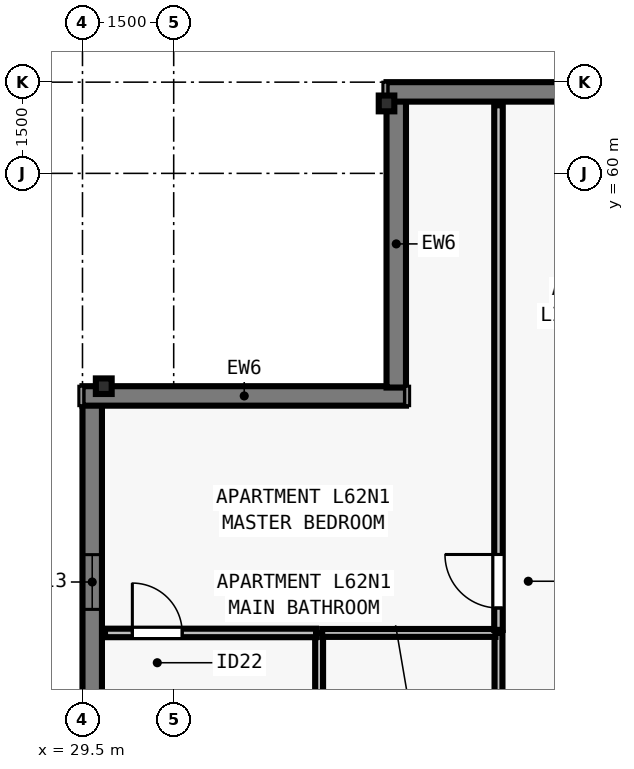
"""IFC4 building model, lengths in metres.
Left out: names, types, materials, properties, quantities, classifications, styles, units other than length and angle.
Written with IfcOpenShell. Run it as: python <this file> out.ifc"""

import sys

from ifc_helpers import new_model, si_unit, direction, frame, frame_2d, origin, origin_2d, place, context, subcontext, project, spatial, rectangle, i_section, extrude, element, fill, save


model = new_model("IFC4")
c1 = context("Model", 3, precision=1e-05, world=origin(), true_north=direction((0.0, 1.0)))
c2 = subcontext(c1, "Body", "Model", "MODEL_VIEW")
j1 = project(units=[si_unit("LENGTHUNIT", "METRE"), si_unit("PLANEANGLEUNIT", "RADIAN")], contexts=[c1])
p1 = place(None, origin())
s1 = spatial("IfcSite", under=j1, at=p1, CompositionType="ELEMENT")
p2 = place(p1, origin())
s2 = spatial("IfcBuilding", under=s1, at=p2, CompositionType="ELEMENT")
p3 = place(p2, frame((0.0, 0.0, 227.0)))
s3 = spatial("IfcBuildingStorey", under=s2, at=p3, CompositionType="ELEMENT", Elevation=227.0)
for number, where, z_axis, x_axis in (
    (1, (34.5, 61.15, 0.0), (0.0, 0.0, 1.0), (1.0, 0.0, 0.0)),
    (2, (29.85, 56.5, 0.0), (0.0, 0.0, 1.0), (0.0, 1.0, 0.0)),
):
    element("IfcColumn", number, at=place(p3, frame(where, z_axis=z_axis, x_axis=x_axis)), inside=s3, PredefinedType="COLUMN", context=c2, shape_type="SweptSolid", body=[
        extrude(i_section(OverallWidth=0.256, OverallDepth=0.26, WebThickness=0.01, FlangeThickness=0.017, FilletRadius=0.013, at=origin_2d()), origin(), (0.0, 0.0, 1.0), 3.5),
    ])
p4 = place(p3, frame((29.66, 49.8, 0.0), z_axis=(0.0, 0.0, 1.0), x_axis=(0.0, 1.0, 0.0)))
e3 = element("IfcWall", 3, at=p4, inside=s3, PredefinedType="SOLIDWALL", context=c2, shape_type="SweptSolid", body=[
    extrude(rectangle(XDim=6.402, YDim=0.32, at=frame_2d((3.201, 0.0))), origin(), (0.0, 0.0, 1.0), 3.29),
])
p5 = place(p4, frame((3.03, 0.0, 0.8)))
e4 = element("IfcOpeningElement", 4, at=p5, cuts=e3, PredefinedType="OPENING", context=c2, shape_type="SweptSolid", body=[
    extrude(rectangle(XDim=0.9, YDim=1.678, at=frame_2d((0.45, 0.839))), frame((0.0, 0.17, 0.0), z_axis=(0.0, -1.0, 0.0), x_axis=(1.0, 0.0, 0.0)), (0.0, 0.0, 1.0), 0.34),
])
p6 = place(p3, frame((29.5, 56.34, 0.0), z_axis=(0.0, 0.0, 1.0), x_axis=(1.0, 0.0, 0.0)))
e5 = element("IfcWall", 5, at=p6, inside=s3, PredefinedType="SOLIDWALL", context=c2, shape_type="SweptSolid", body=[
    extrude(rectangle(XDim=5.32, YDim=0.32, at=frame_2d((2.66, 0.0))), origin(), (0.0, 0.0, 1.0), 3.29),
])
p7 = place(p3, frame((34.66, 56.478, 0.0), z_axis=(0.0, 0.0, 1.0), x_axis=(0.0, 1.0, 0.0)))
e6 = element("IfcWall", 6, at=p7, inside=s3, PredefinedType="SOLIDWALL", context=c2, shape_type="SweptSolid", body=[
    extrude(rectangle(XDim=4.724, YDim=0.32, at=frame_2d((2.362, 0.0))), origin(), (0.0, 0.0, 1.0), 3.29),
])
p8 = place(p3, frame((34.5, 61.34, 0.0), z_axis=(0.0, 0.0, 1.0), x_axis=(1.0, 0.0, 0.0)))
e7 = element("IfcWall", 7, at=p8, inside=s3, PredefinedType="SOLIDWALL", context=c2, shape_type="SweptSolid", body=[
    extrude(rectangle(XDim=34.702, YDim=0.32, at=frame_2d((17.351, 0.0))), origin(), (0.0, 0.0, 1.0), 3.29),
])
p9 = place(p8, frame((4.312, 0.0, 0.8)))
e8 = element("IfcOpeningElement", 8, at=p9, cuts=e7, PredefinedType="OPENING", context=c2, shape_type="SweptSolid", body=[
    extrude(rectangle(XDim=1.55, YDim=1.678, at=frame_2d((0.775, 0.839))), frame((0.0, 0.17, 0.0), z_axis=(0.0, -1.0, 0.0), x_axis=(1.0, 0.0, 0.0)), (0.0, 0.0, 1.0), 0.34),
])
p10 = place(p8, frame((7.988, 0.0, 0.8)))
e9 = element("IfcOpeningElement", 9, at=p10, cuts=e7, PredefinedType="OPENING", context=c2, shape_type="SweptSolid", body=[
    extrude(rectangle(XDim=1.85, YDim=1.678, at=frame_2d((0.925, 0.839))), frame((0.0, 0.17, 0.0), z_axis=(0.0, -1.0, 0.0), x_axis=(1.0, 0.0, 0.0)), (0.0, 0.0, 1.0), 0.34),
])
p11 = place(p8, frame((15.188, 0.0, 0.8)))
e10 = element("IfcOpeningElement", 10, at=p11, cuts=e7, PredefinedType="OPENING", context=c2, shape_type="SweptSolid", body=[
    extrude(rectangle(XDim=1.85, YDim=1.678, at=frame_2d((0.925, 0.839))), frame((0.0, 0.17, 0.0), z_axis=(0.0, -1.0, 0.0), x_axis=(1.0, 0.0, 0.0)), (0.0, 0.0, 1.0), 0.34),
])
p12 = place(p8, frame((18.264, 0.0, 0.8)))
e11 = element("IfcOpeningElement", 11, at=p12, cuts=e7, PredefinedType="OPENING", context=c2, shape_type="SweptSolid", body=[
    extrude(rectangle(XDim=1.55, YDim=1.678, at=frame_2d((0.775, 0.839))), frame((0.0, 0.17, 0.0), z_axis=(0.0, -1.0, 0.0), x_axis=(1.0, 0.0, 0.0)), (0.0, 0.0, 1.0), 0.34),
])
p13 = place(p8, frame((25.014, 0.0, 0.8)))
e12 = element("IfcOpeningElement", 12, at=p13, cuts=e7, PredefinedType="OPENING", context=c2, shape_type="SweptSolid", body=[
    extrude(rectangle(XDim=1.55, YDim=1.678, at=frame_2d((0.775, 0.839))), frame((0.0, 0.17, 0.0), z_axis=(0.0, -1.0, 0.0), x_axis=(1.0, 0.0, 0.0)), (0.0, 0.0, 1.0), 0.34),
])
p14 = place(p8, frame((10.95, 0.0, 0.8)))
e13 = element("IfcOpeningElement", 13, at=p14, cuts=e7, PredefinedType="OPENING", context=c2, shape_type="SweptSolid", body=[
    extrude(rectangle(XDim=0.9, YDim=1.678, at=frame_2d((0.45, 0.839))), frame((0.0, 0.17, 0.0), z_axis=(0.0, -1.0, 0.0), x_axis=(1.0, 0.0, 0.0)), (0.0, 0.0, 1.0), 0.34),
])
p15 = place(p8, frame((22.87, 0.0, 0.8)))
e14 = element("IfcOpeningElement", 14, at=p15, cuts=e7, PredefinedType="OPENING", context=c2, shape_type="SweptSolid", body=[
    extrude(rectangle(XDim=0.9, YDim=1.678, at=frame_2d((0.45, 0.839))), frame((0.0, 0.17, 0.0), z_axis=(0.0, -1.0, 0.0), x_axis=(1.0, 0.0, 0.0)), (0.0, 0.0, 1.0), 0.34),
])
p16 = place(p3, frame((33.391, 49.692, 0.0), z_axis=(0.0, 0.0, 1.0), x_axis=(0.0, 1.0, 0.0)))
e15 = element("IfcWall", 15, at=p16, inside=s3, PredefinedType="PLUMBINGWALL", context=c2, shape_type="SweptSolid", body=[
    extrude(rectangle(XDim=2.75, YDim=0.13, at=frame_2d((1.375, 0.0))), origin(), (0.0, 0.0, 1.0), 3.29),
])
p17 = place(p3, frame((36.341, 49.692, 0.0), z_axis=(0.0, 0.0, 1.0), x_axis=(0.0, 1.0, 0.0)))
e16 = element("IfcWall", 16, at=p17, inside=s3, PredefinedType="PLUMBINGWALL", context=c2, shape_type="SweptSolid", body=[
    extrude(rectangle(XDim=2.75, YDim=0.13, at=frame_2d((1.375, 0.0))), origin(), (0.0, 0.0, 1.0), 3.29),
])
p18 = place(p17, frame((0.55, 0.0, 0.0)))
e17 = element("IfcOpeningElement", 17, at=p18, cuts=e16, PredefinedType="OPENING", context=c2, shape_type="SweptSolid", body=[
    extrude(rectangle(XDim=0.85, YDim=2.08, at=frame_2d((0.425, 1.04))), frame((0.0, 0.075, 0.0), z_axis=(0.0, -1.0, 0.0), x_axis=(1.0, 0.0, 0.0)), (0.0, 0.0, 1.0), 0.15),
])
p19 = place(p3, frame((33.441, 52.442, 0.0), z_axis=(0.0, 0.0, 1.0), x_axis=(1.0, 0.0, 0.0)))
e18 = element("IfcWall", 18, at=p19, inside=s3, PredefinedType="PLUMBINGWALL", context=c2, shape_type="SweptSolid", body=[
    extrude(rectangle(XDim=2.85, YDim=0.13, at=frame_2d((1.425, 0.0))), origin(), (0.0, 0.0, 1.0), 2.958),
])
p20 = place(p3, frame((36.341, 52.492, 0.0), z_axis=(0.0, 0.0, 1.0), x_axis=(0.0, 1.0, 0.0)))
e19 = element("IfcWall", 19, at=p20, inside=s3, PredefinedType="PARTITIONING", context=c2, shape_type="SweptSolid", body=[
    extrude(rectangle(XDim=8.628, YDim=0.14, at=frame_2d((4.314, 0.0))), origin(), (0.0, 0.0, 1.0), 2.573),
])
p21 = place(p20, frame((0.36, 0.0, 0.0)))
e20 = element("IfcOpeningElement", 20, at=p21, cuts=e19, PredefinedType="OPENING", context=c2, shape_type="SweptSolid", body=[
    extrude(rectangle(XDim=0.88, YDim=2.1, at=frame_2d((0.44, 1.05))), frame((0.0, 0.08, 0.0), z_axis=(0.0, -1.0, 0.0), x_axis=(1.0, 0.0, 0.0)), (0.0, 0.0, 1.0), 0.16),
])
p22 = place(p3, frame((29.87, 52.442, 0.0), z_axis=(0.0, 0.0, 1.0), x_axis=(1.0, 0.0, 0.0)))
e21 = element("IfcWall", 21, at=p22, inside=s3, PredefinedType="PARTITIONING", context=c2, shape_type="SweptSolid", body=[
    extrude(rectangle(XDim=3.471, YDim=0.14, at=frame_2d((1.736, 0.0))), origin(), (0.0, 0.0, 1.0), 3.29),
])
p23 = place(p22, frame((0.45, 0.0, 0.0)))
e22 = element("IfcOpeningElement", 22, at=p23, cuts=e21, PredefinedType="OPENING", context=c2, shape_type="SweptSolid", body=[
    extrude(rectangle(XDim=0.82, YDim=2.1, at=frame_2d((0.41, 1.05))), frame((0.0, 0.08, 0.0), z_axis=(0.0, -1.0, 0.0), x_axis=(1.0, 0.0, 0.0)), (0.0, 0.0, 1.0), 0.16),
])
p24 = place(p5, origin())
e23 = element("IfcWindow", 23, at=p24, inside=s3, PartitioningType="SINGLE_PANEL", PredefinedType="WINDOW", context=c2, shape_type="SweptSolid", body=[
    extrude(rectangle(XDim=0.9, YDim=1.678, at=frame_2d((0.45, 0.839))), frame((0.0, -0.04, 0.0), z_axis=(0.0, -1.0, 0.0), x_axis=(1.0, 0.0, 0.0)), (0.0, 0.0, 1.0), 0.06),
])
fill(e4, e23)
p25 = place(p23, origin())
e24 = element("IfcDoor", 24, at=p25, inside=s3, OperationType="SINGLE_SWING_LEFT", PredefinedType="DOOR", context=c2, shape_type="SweptSolid", body=[
    extrude(rectangle(XDim=0.82, YDim=2.1, at=frame_2d((0.41, 1.05))), frame((0.0, 0.025, 0.0), z_axis=(0.0, -1.0, 0.0), x_axis=(1.0, 0.0, 0.0)), (0.0, 0.0, 1.0), 0.05),
])
fill(e22, e24)
p26 = place(p21, origin())
e25 = element("IfcDoor", 25, at=p26, inside=s3, OperationType="SINGLE_SWING_RIGHT", PredefinedType="DOOR", context=c2, shape_type="SweptSolid", body=[
    extrude(rectangle(XDim=0.88, YDim=2.1, at=frame_2d((0.44, 1.05))), frame((0.0, 0.025, 0.0), z_axis=(0.0, -1.0, 0.0), x_axis=(1.0, 0.0, 0.0)), (0.0, 0.0, 1.0), 0.05),
])
fill(e20, e25)
save(model, sys.argv[1])
